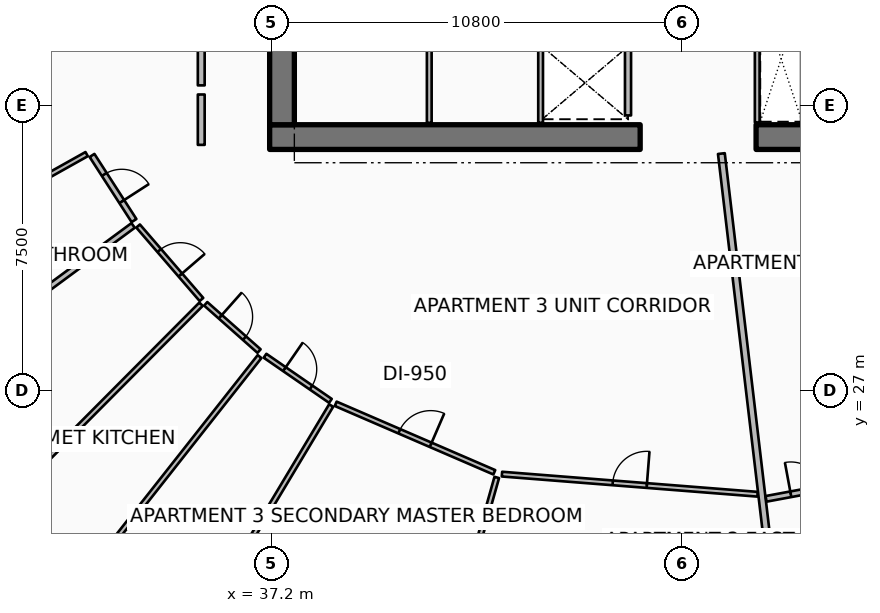
"""IFC4 building model, lengths in metres.
Left out: names, types, materials, properties, quantities, classifications, styles, units other than length and angle.
Written with IfcOpenShell. Run it as: python <this file> out.ifc"""

import sys

from ifc_helpers import new_model, si_unit, direction, frame, frame_2d, origin, place, context, subcontext, project, spatial, rectangle, extrude, element, fill, save


model = new_model("IFC4")
c1 = context("Model", 3, precision=1e-05, world=origin(), true_north=direction((0.0, 1.0)))
c2 = subcontext(c1, "Body", "Model", "MODEL_VIEW")
j1 = project(units=[si_unit("LENGTHUNIT", "METRE"), si_unit("PLANEANGLEUNIT", "RADIAN")], contexts=[c1])
p1 = place(None, origin())
s1 = spatial("IfcSite", under=j1, at=p1, CompositionType="ELEMENT")
p2 = place(p1, origin())
s2 = spatial("IfcBuilding", under=s1, at=p2, CompositionType="ELEMENT")
p3 = place(p2, frame((0.0, 0.0, 210.3)))
s3 = spatial("IfcBuildingStorey", under=s2, at=p3, CompositionType="ELEMENT", Elevation=210.3)
for number, where, z_axis, x_axis in (
    (1, (37.15, 33.675, 0.0), (0.0, 0.0, 1.0), (1.0, 0.0, 0.0)),
    (2, (49.95, 33.675, 0.0), (0.0, 0.0, 1.0), (1.0, 0.0, 0.0)),
):
    element("IfcWall", number, at=place(p3, frame(where, z_axis=z_axis, x_axis=x_axis)), inside=s3, PredefinedType="SHEAR", context=c2, shape_type="SweptSolid", body=[
        extrude(rectangle(XDim=9.75, YDim=0.65, at=frame_2d((4.875, 0.0))), origin(), (0.0, 0.0, 1.0), 3.75),
    ])
p4 = place(p3, frame((37.475, 34.0, 0.0), z_axis=(0.0, 0.0, 1.0), x_axis=(0.0, 1.0, 0.0)))
e3 = element("IfcWall", 3, at=p4, inside=s3, PredefinedType="SHEAR", context=c2, shape_type="SweptSolid", body=[
    extrude(rectangle(XDim=16.0, YDim=0.65, at=frame_2d((8.0, 0.0))), origin(), (0.0, 0.0, 1.0), 3.75),
])
p5 = place(p3, frame((46.58, 34.245, 0.0), z_axis=(0.0, 0.0, 1.0), x_axis=(0.0, 1.0, 0.0)))
e4 = element("IfcWall", 4, at=p5, inside=s3, PredefinedType="PARTITIONING", context=c2, shape_type="SweptSolid", body=[
    extrude(rectangle(XDim=1.71, YDim=0.16, at=frame_2d((0.855, 0.0))), origin(), (0.0, 0.0, 1.0), 3.5),
])
for number, where, z_axis, x_axis in (
    (5, (44.28, 34.05, 0.0), (0.0, 0.0, 1.0), (0.0, 1.0, 0.0)),
    (6, (41.35, 34.05, 0.0), (0.0, 0.0, 1.0), (0.0, 1.0, 0.0)),
):
    element("IfcWall", number, at=place(p3, frame(where, z_axis=z_axis, x_axis=x_axis)), inside=s3, PredefinedType="PARTITIONING", context=c2, shape_type="SweptSolid", body=[
        extrude(rectangle(XDim=2.03, YDim=0.125, at=frame_2d((1.015, 0.0))), origin(), (0.0, 0.0, 1.0), 2.94),
    ])
p6 = place(p3, frame((49.98, 34.06, 0.0), z_axis=(0.0, 0.0, 1.0), x_axis=(0.0, 1.0, 0.0)))
e7 = element("IfcWall", 7, at=p6, inside=s3, PredefinedType="PARTITIONING", context=c2, shape_type="SweptSolid", body=[
    extrude(rectangle(XDim=3.4, YDim=0.125, at=frame_2d((1.7, 0.0))), origin(), (0.0, 0.0, 1.0), 2.94),
])
p7 = place(p3, frame((49.037, 33.241, 0.0), z_axis=(0.0, 0.0, 1.0), x_axis=(0.11753742895, -0.993068453228, 0.0)))
e8 = element("IfcWall", 8, at=p7, inside=s3, PredefinedType="PARTITIONING", context=c2, shape_type="SweptSolid", body=[
    extrude(rectangle(XDim=13.815, YDim=0.18, at=frame_2d((6.907, 0.0))), origin(), (0.0, 0.0, 1.0), 2.94),
])
p8 = place(p3, frame((35.35, 40.383, 0.0), z_axis=(0.0, 0.0, 1.0), x_axis=(0.0, -1.0, 0.0)))
e9 = element("IfcWall", 9, at=p8, inside=s3, PredefinedType="PARTITIONING", context=c2, shape_type="SweptSolid", body=[
    extrude(rectangle(XDim=5.347, YDim=0.18, at=frame_2d((2.674, 0.0))), origin(), (0.0, 0.0, 1.0), 2.94),
])
p9 = place(p8, frame((2.124, 0.0, 0.0)))
e10 = element("IfcOpeningElement", 10, at=p9, cuts=e9, PredefinedType="OPENING", context=c2, shape_type="SweptSolid", body=[
    extrude(rectangle(XDim=1.1, YDim=2.1, at=frame_2d((0.55, 1.05))), frame((0.0, 0.1, 0.0), z_axis=(0.0, -1.0, 0.0), x_axis=(1.0, 0.0, 0.0)), (0.0, 0.0, 1.0), 0.2),
])
p10 = place(p3, frame((35.35, 34.796, 0.0), z_axis=(0.0, 0.0, 1.0), x_axis=(0.0, -1.0, 0.0)))
e11 = element("IfcWall", 11, at=p10, inside=s3, PredefinedType="PARTITIONING", context=c2, shape_type="SweptSolid", body=[
    extrude(rectangle(XDim=1.326, YDim=0.18, at=frame_2d((0.663, 0.0))), origin(), (0.0, 0.0, 1.0), 2.94),
])
p11 = place(p3, frame((32.334, 33.227, 0.0), z_axis=(0.0, 0.0, 1.0), x_axis=(-0.872500152392, -0.488613839424, 0.0)))
e12 = element("IfcWall", 12, at=p11, inside=s3, PredefinedType="PARTITIONING", context=c2, shape_type="SweptSolid", body=[
    extrude(rectangle(XDim=9.94, YDim=0.125, at=frame_2d((4.97, 0.0))), origin(), (0.0, 0.0, 1.0), 2.94),
])
p12 = place(p3, frame((32.476, 33.192, 0.0), z_axis=(0.0, 0.0, 1.0), x_axis=(0.542143239932, -0.840286086637, 0.0)))
e13 = element("IfcWall", 13, at=p12, inside=s3, PredefinedType="PARTITIONING", context=c2, shape_type="SweptSolid", body=[
    extrude(rectangle(XDim=2.038, YDim=0.15, at=frame_2d((1.019, 0.0))), origin(), (0.0, 0.0, 1.0), 2.94),
])
p13 = place(p12, frame((0.594, 0.0, 0.0)))
e14 = element("IfcOpeningElement", 14, at=p13, cuts=e13, PredefinedType="OPENING", context=c2, shape_type="SweptSolid", body=[
    extrude(rectangle(XDim=0.85, YDim=2.06, at=frame_2d((0.425, 1.03))), frame((0.0, 0.085, 0.0), z_axis=(0.0, -1.0, 0.0), x_axis=(1.0, 0.0, 0.0)), (0.0, 0.0, 1.0), 0.17),
])
p14 = place(p3, frame((33.557, 31.35, 0.0), z_axis=(0.0, 0.0, 1.0), x_axis=(-0.804841149106, -0.593490290322, 0.0)))
e15 = element("IfcWall", 15, at=p14, inside=s3, PredefinedType="PARTITIONING", context=c2, shape_type="SweptSolid", body=[
    extrude(rectangle(XDim=4.46, YDim=0.15, at=frame_2d((2.23, 0.0))), origin(), (0.0, 0.0, 1.0), 2.94),
])
p15 = place(p3, frame((35.344, 29.277, 0.0), z_axis=(0.0, 0.0, 1.0), x_axis=(-0.705226489462, -0.708982086206, 0.0)))
e16 = element("IfcWall", 16, at=p15, inside=s3, PredefinedType="PARTITIONING", context=c2, shape_type="SweptSolid", body=[
    extrude(rectangle(XDim=9.166, YDim=0.125, at=frame_2d((4.583, 0.0))), origin(), (0.0, 0.0, 1.0), 2.94),
])
p16 = place(p3, frame((33.688, 31.335, 0.0), z_axis=(0.0, 0.0, 1.0), x_axis=(0.653119308398, -0.757255022431, 0.0)))
e17 = element("IfcWall", 17, at=p16, inside=s3, PredefinedType="PARTITIONING", context=c2, shape_type="SweptSolid", body=[
    extrude(rectangle(XDim=2.553, YDim=0.125, at=frame_2d((1.277, 0.0))), origin(), (0.0, 0.0, 1.0), 2.94),
])
p17 = place(p16, frame((0.852, 0.0, 0.0)))
e18 = element("IfcOpeningElement", 18, at=p17, cuts=e17, PredefinedType="OPENING", context=c2, shape_type="SweptSolid", body=[
    extrude(rectangle(XDim=0.85, YDim=2.06, at=frame_2d((0.425, 1.03))), frame((0.0, 0.073, 0.0), z_axis=(0.0, -1.0, 0.0), x_axis=(1.0, 0.0, 0.0)), (0.0, 0.0, 1.0), 0.145),
])
p18 = place(p3, frame((35.468, 29.288, 0.0), z_axis=(0.0, 0.0, 1.0), x_axis=(0.748399816021, -0.663247853656, 0.0)))
e19 = element("IfcWall", 19, at=p18, inside=s3, PredefinedType="PARTITIONING", context=c2, shape_type="SweptSolid", body=[
    extrude(rectangle(XDim=1.875, YDim=0.125, at=frame_2d((0.938, 0.0))), origin(), (0.0, 0.0, 1.0), 2.94),
])
p19 = place(p18, frame((0.512, 0.0, 0.0)))
e20 = element("IfcOpeningElement", 20, at=p19, cuts=e19, PredefinedType="OPENING", context=c2, shape_type="SweptSolid", body=[
    extrude(rectangle(XDim=0.85, YDim=2.06, at=frame_2d((0.425, 1.03))), frame((0.0, 0.073, 0.0), z_axis=(0.0, -1.0, 0.0), x_axis=(1.0, 0.0, 0.0)), (0.0, 0.0, 1.0), 0.145),
])
p20 = place(p3, frame((36.884, 27.9, 0.0), z_axis=(0.0, 0.0, 1.0), x_axis=(-0.619094580594, -0.785316433216, 0.0)))
e21 = element("IfcWall", 21, at=p20, inside=s3, PredefinedType="PARTITIONING", context=c2, shape_type="SweptSolid", body=[
    extrude(rectangle(XDim=9.175, YDim=0.125, at=frame_2d((4.588, 0.0))), origin(), (0.0, 0.0, 1.0), 2.94),
])
p21 = place(p3, frame((38.768, 26.612, 0.0), z_axis=(0.0, 0.0, 1.0), x_axis=(-0.514431677275, -0.857531369348, 0.0)))
e22 = element("IfcWall", 22, at=p21, inside=s3, PredefinedType="PARTITIONING", context=c2, shape_type="SweptSolid", body=[
    extrude(rectangle(XDim=7.844, YDim=0.125, at=frame_2d((3.922, 0.0))), origin(), (0.0, 0.0, 1.0), 2.94),
])
p22 = place(p3, frame((37.028, 27.921, 0.0), z_axis=(0.0, 0.0, 1.0), x_axis=(0.823103592367, -0.567891253879, 0.0)))
e23 = element("IfcWall", 23, at=p22, inside=s3, PredefinedType="PARTITIONING", context=c2, shape_type="SweptSolid", body=[
    extrude(rectangle(XDim=2.09, YDim=0.125, at=frame_2d((1.045, 0.0))), origin(), (0.0, 0.0, 1.0), 2.94),
])
p23 = place(p22, frame((0.62, 0.0, 0.0)))
e24 = element("IfcOpeningElement", 24, at=p23, cuts=e23, PredefinedType="OPENING", context=c2, shape_type="SweptSolid", body=[
    extrude(rectangle(XDim=0.85, YDim=2.06, at=frame_2d((0.425, 1.03))), frame((0.0, 0.073, 0.0), z_axis=(0.0, -1.0, 0.0), x_axis=(1.0, 0.0, 0.0)), (0.0, 0.0, 1.0), 0.145),
])
p24 = place(p3, frame((38.888, 26.657, 0.0), z_axis=(0.0, 0.0, 1.0), x_axis=(0.918052580004, -0.396458648976, 0.0)))
e25 = element("IfcWall", 25, at=p24, inside=s3, PredefinedType="PARTITIONING", context=c2, shape_type="SweptSolid", body=[
    extrude(rectangle(XDim=4.546, YDim=0.125, at=frame_2d((2.273, 0.0))), origin(), (0.0, 0.0, 1.0), 2.94),
])
p25 = place(p24, frame((1.823, 0.0, 0.0)))
e26 = element("IfcOpeningElement", 26, at=p25, cuts=e25, PredefinedType="OPENING", context=c2, shape_type="SweptSolid", body=[
    extrude(rectangle(XDim=0.9, YDim=2.08, at=frame_2d((0.45, 1.04))), frame((0.0, 0.073, 0.0), z_axis=(0.0, -1.0, 0.0), x_axis=(1.0, 0.0, 0.0)), (0.0, 0.0, 1.0), 0.145),
])
p26 = place(p3, frame((43.126, 24.719, 0.0), z_axis=(0.0, 0.0, 1.0), x_axis=(-0.271429339147, -0.962458369931, 0.0)))
e27 = element("IfcWall", 27, at=p26, inside=s3, PredefinedType="PARTITIONING", context=c2, shape_type="SweptSolid", body=[
    extrude(rectangle(XDim=6.772, YDim=0.125, at=frame_2d((3.386, 0.0))), origin(), (0.0, 0.0, 1.0), 2.94),
])
p27 = place(p3, frame((43.263, 24.807, 0.0), z_axis=(0.0, 0.0, 1.0), x_axis=(0.996914936791, -0.078489545824, 0.0)))
e28 = element("IfcWall", 28, at=p27, inside=s3, PredefinedType="PARTITIONING", context=c2, shape_type="SweptSolid", body=[
    extrude(rectangle(XDim=6.747, YDim=0.125, at=frame_2d((3.373, 0.0))), origin(), (0.0, 0.0, 1.0), 2.94),
])
p28 = place(p27, frame((2.923, 0.0, 0.0)))
e29 = element("IfcOpeningElement", 29, at=p28, cuts=e28, PredefinedType="OPENING", context=c2, shape_type="SweptSolid", body=[
    extrude(rectangle(XDim=0.9, YDim=2.08, at=frame_2d((0.45, 1.04))), frame((0.0, 0.073, 0.0), z_axis=(0.0, -1.0, 0.0), x_axis=(1.0, 0.0, 0.0)), (0.0, 0.0, 1.0), 0.145),
])
p29 = place(p3, frame((50.212, 24.156, 0.0), z_axis=(0.0, 0.0, 1.0), x_axis=(0.983198523617, 0.182539483832, 0.0)))
e30 = element("IfcWall", 30, at=p29, inside=s3, PredefinedType="PARTITIONING", context=c2, shape_type="SweptSolid", body=[
    extrude(rectangle(XDim=2.175, YDim=0.15, at=frame_2d((1.087, 0.0))), origin(), (0.0, 0.0, 1.0), 2.94),
])
p30 = place(p29, frame((0.662, 0.0, 0.0)))
e31 = element("IfcOpeningElement", 31, at=p30, cuts=e30, PredefinedType="OPENING", context=c2, shape_type="SweptSolid", body=[
    extrude(rectangle(XDim=0.85, YDim=2.06, at=frame_2d((0.425, 1.03))), frame((0.0, 0.085, 0.0), z_axis=(0.0, -1.0, 0.0), x_axis=(1.0, 0.0, 0.0)), (0.0, 0.0, 1.0), 0.17),
])
p31 = place(p13, origin())
e32 = element("IfcDoor", 32, at=p31, inside=s3, OperationType="SINGLE_SWING_RIGHT", PredefinedType="DOOR", context=c2, shape_type="SweptSolid", body=[
    extrude(rectangle(XDim=0.85, YDim=2.06, at=frame_2d((0.425, 1.03))), frame((0.0, 0.025, 0.0), z_axis=(0.0, -1.0, 0.0), x_axis=(1.0, 0.0, 0.0)), (0.0, 0.0, 1.0), 0.05),
])
fill(e14, e32)
p32 = place(p17, origin())
e33 = element("IfcDoor", 33, at=p32, inside=s3, OperationType="SINGLE_SWING_RIGHT", PredefinedType="DOOR", context=c2, shape_type="SweptSolid", body=[
    extrude(rectangle(XDim=0.85, YDim=2.06, at=frame_2d((0.425, 1.03))), frame((0.0, 0.025, 0.0), z_axis=(0.0, -1.0, 0.0), x_axis=(1.0, 0.0, 0.0)), (0.0, 0.0, 1.0), 0.05),
])
fill(e18, e33)
p33 = place(p19, origin())
e34 = element("IfcDoor", 34, at=p33, inside=s3, OperationType="SINGLE_SWING_LEFT", PredefinedType="DOOR", context=c2, shape_type="SweptSolid", body=[
    extrude(rectangle(XDim=0.85, YDim=2.06, at=frame_2d((0.425, 1.03))), frame((0.0, 0.025, 0.0), z_axis=(0.0, -1.0, 0.0), x_axis=(1.0, 0.0, 0.0)), (0.0, 0.0, 1.0), 0.05),
])
fill(e20, e34)
p34 = place(p23, origin())
e35 = element("IfcDoor", 35, at=p34, inside=s3, OperationType="SINGLE_SWING_LEFT", PredefinedType="DOOR", context=c2, shape_type="SweptSolid", body=[
    extrude(rectangle(XDim=0.85, YDim=2.06, at=frame_2d((0.425, 1.03))), frame((0.0, 0.025, 0.0), z_axis=(0.0, -1.0, 0.0), x_axis=(1.0, 0.0, 0.0)), (0.0, 0.0, 1.0), 0.05),
])
fill(e24, e35)
p35 = place(p25, origin())
e36 = element("IfcDoor", 36, at=p35, inside=s3, OperationType="SINGLE_SWING_RIGHT", PredefinedType="DOOR", context=c2, shape_type="SweptSolid", body=[
    extrude(rectangle(XDim=0.9, YDim=2.08, at=frame_2d((0.45, 1.04))), frame((0.0, 0.025, 0.0), z_axis=(0.0, -1.0, 0.0), x_axis=(1.0, 0.0, 0.0)), (0.0, 0.0, 1.0), 0.05),
])
fill(e26, e36)
p36 = place(p28, origin())
e37 = element("IfcDoor", 37, at=p36, inside=s3, OperationType="SINGLE_SWING_RIGHT", PredefinedType="DOOR", context=c2, shape_type="SweptSolid", body=[
    extrude(rectangle(XDim=0.9, YDim=2.08, at=frame_2d((0.45, 1.04))), frame((0.0, 0.025, 0.0), z_axis=(0.0, -1.0, 0.0), x_axis=(1.0, 0.0, 0.0)), (0.0, 0.0, 1.0), 0.05),
])
fill(e29, e37)
p37 = place(p30, origin())
e38 = element("IfcDoor", 38, at=p37, inside=s3, OperationType="SINGLE_SWING_LEFT", PredefinedType="DOOR", context=c2, shape_type="SweptSolid", body=[
    extrude(rectangle(XDim=0.85, YDim=2.06, at=frame_2d((0.425, 1.03))), frame((0.0, 0.025, 0.0), z_axis=(0.0, -1.0, 0.0), x_axis=(1.0, 0.0, 0.0)), (0.0, 0.0, 1.0), 0.05),
])
fill(e31, e38)
save(model, sys.argv[1])
